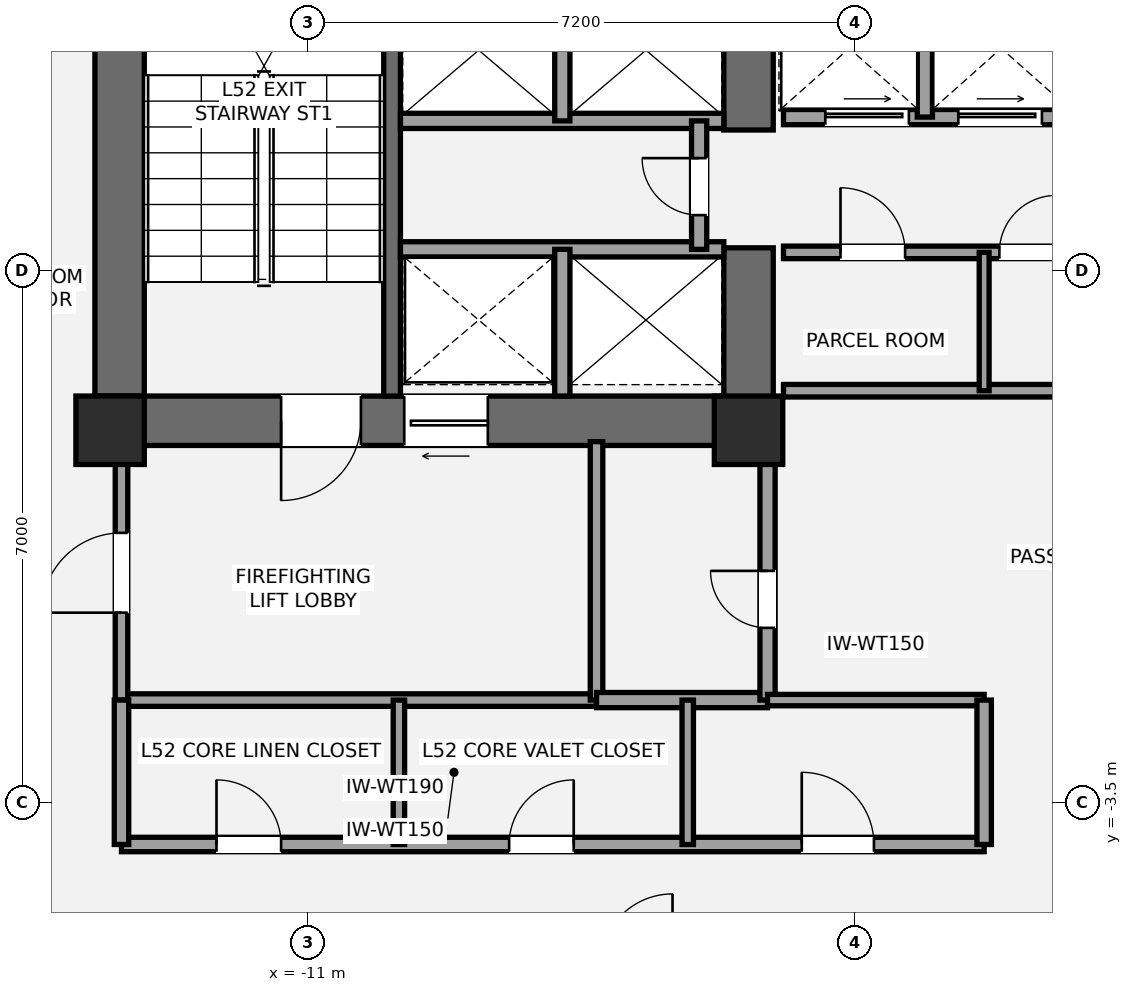
"""IFC4 building model, lengths in metres.
Left out: names, types, materials, properties, quantities, classifications, styles, units other than length and angle.
Written with IfcOpenShell. Run it as: python <this file> out.ifc"""

import sys

from ifc_helpers import new_model, si_unit, direction, frame, frame_2d, origin, origin_2d, place, context, subcontext, project, spatial, rectangle, extrude, element, fill, save


model = new_model("IFC4")
c1 = context("Model", 3, precision=1e-05, world=origin(), true_north=direction((0.0, 1.0)))
c2 = subcontext(c1, "Body", "Model", "MODEL_VIEW")
j1 = project(units=[si_unit("LENGTHUNIT", "METRE"), si_unit("PLANEANGLEUNIT", "RADIAN")], contexts=[c1])
p1 = place(None, origin())
s1 = spatial("IfcSite", under=j1, at=p1, CompositionType="ELEMENT")
p2 = place(p1, origin())
s2 = spatial("IfcBuilding", under=s1, at=p2, CompositionType="ELEMENT")
p3 = place(p2, frame((0.0, 0.0, 188.6)))
s3 = spatial("IfcBuildingStorey", under=s2, at=p3, CompositionType="ELEMENT", Elevation=188.6)
p4 = place(p3, frame((-13.475, 1.2, 0.0), z_axis=(0.0, 0.0, 1.0), x_axis=(0.0, 1.0, 0.0)))
e1 = element("IfcWall", 1, at=p4, inside=s3, PredefinedType="SHEAR", context=c2, shape_type="SweptSolid", body=[
    extrude(rectangle(XDim=8.45, YDim=0.65, at=frame_2d((4.225, 0.0))), origin(), (0.0, 0.0, 1.0), 3.2),
])
p5 = place(p3, frame((-4.875, 1.525, 0.0), z_axis=(0.0, 0.0, 1.0), x_axis=(-1.0, 0.0, 0.0)))
e2 = element("IfcWall", 2, at=p5, inside=s3, PredefinedType="SHEAR", context=c2, shape_type="SweptSolid", body=[
    extrude(rectangle(XDim=8.925, YDim=0.65, at=frame_2d((4.462, 0.0))), origin(), (0.0, 0.0, 1.0), 3.2),
])
p6 = place(p5, frame((5.425, 0.0, 0.0)))
e3 = element("IfcOpeningElement", 3, at=p6, cuts=e2, PredefinedType="OPENING", context=c2, shape_type="SweptSolid", body=[
    extrude(rectangle(XDim=1.05, YDim=2.15, at=frame_2d((0.525, 1.075))), frame((0.0, 0.335, 0.0), z_axis=(0.0, -1.0, 0.0), x_axis=(1.0, 0.0, 0.0)), (0.0, 0.0, 1.0), 0.67),
])
p7 = place(p5, frame((3.755, 0.0, 0.0)))
e4 = element("IfcOpeningElement", 4, at=p7, cuts=e2, PredefinedType="OPENING", context=c2, shape_type="SweptSolid", body=[
    extrude(rectangle(XDim=1.1, YDim=2.2, at=frame_2d((0.55, 1.1))), frame((0.0, 0.335, 0.0), z_axis=(0.0, -1.0, 0.0), x_axis=(1.0, 0.0, 0.0)), (0.0, 0.0, 1.0), 0.67),
])
p8 = place(p3, frame((-5.2, 1.2, 0.0), z_axis=(0.0, 0.0, 1.0), x_axis=(0.0, 1.0, 0.0)))
e5 = element("IfcWall", 5, at=p8, inside=s3, PredefinedType="SHEAR", context=c2, shape_type="SweptSolid", body=[
    extrude(rectangle(XDim=2.6, YDim=0.65, at=frame_2d((1.3, 0.0))), origin(), (0.0, 0.0, 1.0), 3.2),
])
p9 = place(p3, frame((-5.2, 5.35, 0.0), z_axis=(0.0, 0.0, 1.0), x_axis=(0.0, 1.0, 0.0)))
e6 = element("IfcWall", 6, at=p9, inside=s3, PredefinedType="SHEAR", context=c2, shape_type="SweptSolid", body=[
    extrude(rectangle(XDim=2.0, YDim=0.65, at=frame_2d((1.0, 0.0))), origin(), (0.0, 0.0, 1.0), 3.2),
])
p10 = place(p3, frame((-9.89, 1.85, 0.0), z_axis=(0.0, 0.0, 1.0), x_axis=(0.0, 1.0, 0.0)))
e7 = element("IfcWall", 7, at=p10, inside=s3, PredefinedType="SHEAR", context=c2, shape_type="SweptSolid", body=[
    extrude(rectangle(XDim=7.15, YDim=0.22, at=frame_2d((3.575, 0.0))), origin(), (0.0, 0.0, 1.0), 3.2),
])
for number, where, z_axis, x_axis in (
    (8, (-13.6, 1.4, 0.0), (0.0, 0.0, 1.0), (1.0, 0.0, 0.0)),
    (9, (-5.2, 1.4, 0.0), (0.0, 0.0, 1.0), (1.0, 0.0, 0.0)),
):
    element("IfcColumn", number, at=place(p3, frame(where, z_axis=z_axis, x_axis=x_axis)), inside=s3, PredefinedType="COLUMN", context=c2, shape_type="SweptSolid", body=[
        extrude(rectangle(XDim=0.9, YDim=0.9, at=origin_2d()), origin(), (0.0, 0.0, 1.0), 3.2),
    ])
p11 = place(p3, frame((-13.45, -2.15, 0.0), z_axis=(0.0, 0.0, 1.0), x_axis=(1.0, 0.0, 0.0)))
e10 = element("IfcWall", 10, at=p11, inside=s3, PredefinedType="PARTITIONING", context=c2, shape_type="SweptSolid", body=[
    extrude(rectangle(XDim=6.25, YDim=0.165, at=frame_2d((3.125, 0.0))), origin(), (0.0, 0.0, 1.0), 3.02),
])
p12 = place(p3, frame((-13.45, -2.15, 0.0), z_axis=(0.0, 0.0, 1.0), x_axis=(0.0, 1.0, 0.0)))
e11 = element("IfcWall", 11, at=p12, inside=s3, PredefinedType="PARTITIONING", context=c2, shape_type="SweptSolid", body=[
    extrude(rectangle(XDim=3.4, YDim=0.165, at=frame_2d((1.7, 0.0))), origin(), (0.0, 0.0, 1.0), 2.473),
])
p13 = place(p12, frame((1.15, 0.0, 0.0)))
e12 = element("IfcOpeningElement", 12, at=p13, cuts=e11, PredefinedType="OPENING", context=c2, shape_type="SweptSolid", body=[
    extrude(rectangle(XDim=1.05, YDim=2.15, at=frame_2d((0.525, 1.075))), frame((0.0, 0.093, 0.0), z_axis=(0.0, -1.0, 0.0), x_axis=(1.0, 0.0, 0.0)), (0.0, 0.0, 1.0), 0.185),
])
p14 = place(p3, frame((-7.2, -2.15, 0.0), z_axis=(0.0, 0.0, 1.0), x_axis=(0.0, 1.0, 0.0)))
e13 = element("IfcWall", 13, at=p14, inside=s3, PredefinedType="PARTITIONING", context=c2, shape_type="SweptSolid", body=[
    extrude(rectangle(XDim=3.4, YDim=0.165, at=frame_2d((1.7, 0.0))), origin(), (0.0, 0.0, 1.0), 2.473),
])
p15 = place(p3, frame((-7.2, -2.15, 0.0), z_axis=(0.0, 0.0, 1.0), x_axis=(1.0, 0.0, 0.0)))
e14 = element("IfcWall", 14, at=p15, inside=s3, PredefinedType="SOLIDWALL", context=c2, shape_type="SweptSolid", body=[
    extrude(rectangle(XDim=2.25, YDim=0.2, at=frame_2d((1.125, 0.0))), origin(), (0.0, 0.0, 1.0), 3.02),
])
p16 = place(p3, frame((-4.95, -2.15, 0.0), z_axis=(0.0, 0.0, 1.0), x_axis=(0.0, 1.0, 0.0)))
e15 = element("IfcWall", 15, at=p16, inside=s3, PredefinedType="SOLIDWALL", context=c2, shape_type="SweptSolid", body=[
    extrude(rectangle(XDim=3.4, YDim=0.2, at=frame_2d((1.7, 0.0))), origin(), (0.0, 0.0, 1.0), 2.473),
])
p17 = place(p16, frame((0.95, 0.0, 0.0)))
e16 = element("IfcOpeningElement", 16, at=p17, cuts=e15, PredefinedType="OPENING", context=c2, shape_type="SweptSolid", body=[
    extrude(rectangle(XDim=0.75, YDim=2.1, at=frame_2d((0.375, 1.05))), frame((0.0, 0.11, 0.0), z_axis=(0.0, -1.0, 0.0), x_axis=(1.0, 0.0, 0.0)), (0.0, 0.0, 1.0), 0.22),
])
p18 = place(p3, frame((-9.78, 3.78, 0.0), z_axis=(0.0, 0.0, 1.0), x_axis=(1.0, 0.0, 0.0)))
e17 = element("IfcWall", 17, at=p18, inside=s3, PredefinedType="SOLIDWALL", context=c2, shape_type="SweptSolid", body=[
    extrude(rectangle(XDim=4.255, YDim=0.2, at=frame_2d((2.127, 0.0))), origin(), (0.0, 0.0, 1.0), 3.02),
])
p19 = place(p3, frame((-7.65, 1.85, 0.0), z_axis=(0.0, 0.0, 1.0), x_axis=(0.0, 1.0, 0.0)))
e18 = element("IfcWall", 18, at=p19, inside=s3, PredefinedType="SOLIDWALL", context=c2, shape_type="SweptSolid", body=[
    extrude(rectangle(XDim=1.93, YDim=0.2, at=frame_2d((0.965, 0.0))), origin(), (0.0, 0.0, 1.0), 3.02),
])
p20 = place(p3, frame((-9.78, 5.47, 0.0), z_axis=(0.0, 0.0, 1.0), x_axis=(1.0, 0.0, 0.0)))
e19 = element("IfcWall", 19, at=p20, inside=s3, PredefinedType="SOLIDWALL", context=c2, shape_type="SweptSolid", body=[
    extrude(rectangle(XDim=4.255, YDim=0.2, at=frame_2d((2.127, 0.0))), origin(), (0.0, 0.0, 1.0), 3.02),
])
p21 = place(p3, frame((-7.65, 5.47, 0.0), z_axis=(0.0, 0.0, 1.0), x_axis=(0.0, 1.0, 0.0)))
e20 = element("IfcWall", 20, at=p21, inside=s3, PredefinedType="SOLIDWALL", context=c2, shape_type="SweptSolid", body=[
    extrude(rectangle(XDim=1.86, YDim=0.2, at=frame_2d((0.93, 0.0))), origin(), (0.0, 0.0, 1.0), 3.02),
])
p22 = place(p3, frame((-5.85, 3.78, 0.0), z_axis=(0.0, 0.0, 1.0), x_axis=(0.0, 1.0, 0.0)))
e21 = element("IfcWall", 21, at=p22, inside=s3, PredefinedType="SOLIDWALL", context=c2, shape_type="SweptSolid", body=[
    extrude(rectangle(XDim=1.69, YDim=0.2, at=frame_2d((0.845, 0.0))), origin(), (0.0, 0.0, 1.0), 3.02),
])
p23 = place(p22, frame((0.45, 0.0, 0.0)))
e22 = element("IfcOpeningElement", 22, at=p23, cuts=e21, PredefinedType="OPENING", context=c2, shape_type="SweptSolid", body=[
    extrude(rectangle(XDim=0.75, YDim=2.1, at=frame_2d((0.375, 1.05))), frame((0.0, 0.11, 0.0), z_axis=(0.0, -1.0, 0.0), x_axis=(1.0, 0.0, 0.0)), (0.0, 0.0, 1.0), 0.22),
])
p24 = place(p3, frame((-4.74, 1.92, 0.0), z_axis=(0.0, 0.0, 1.0), x_axis=(1.0, 0.0, 0.0)))
e23 = element("IfcWall", 23, at=p24, inside=s3, PredefinedType="PARTITIONING", context=c2, shape_type="SweptSolid", body=[
    extrude(rectangle(XDim=3.89, YDim=0.165, at=frame_2d((1.945, 0.0))), origin(), (0.0, 0.0, 1.0), 2.16),
])
p25 = place(p3, frame((-4.74, 3.74, 0.0), z_axis=(0.0, 0.0, 1.0), x_axis=(1.0, 0.0, 0.0)))
e24 = element("IfcWall", 24, at=p25, inside=s3, PredefinedType="PARTITIONING", context=c2, shape_type="SweptSolid", body=[
    extrude(rectangle(XDim=3.89, YDim=0.165, at=frame_2d((1.945, 0.0))), origin(), (0.0, 0.0, 1.0), 3.02),
])
p26 = place(p25, frame((0.75, 0.0, 0.0)))
e25 = element("IfcOpeningElement", 25, at=p26, cuts=e24, PredefinedType="OPENING", context=c2, shape_type="SweptSolid", body=[
    extrude(rectangle(XDim=0.85, YDim=2.1, at=frame_2d((0.425, 1.05))), frame((0.0, 0.093, 0.0), z_axis=(0.0, -1.0, 0.0), x_axis=(1.0, 0.0, 0.0)), (0.0, 0.0, 1.0), 0.185),
])
p27 = place(p25, frame((2.84, 0.0, 0.0)))
e26 = element("IfcOpeningElement", 26, at=p27, cuts=e24, PredefinedType="OPENING", context=c2, shape_type="SweptSolid", body=[
    extrude(rectangle(XDim=0.75, YDim=2.1, at=frame_2d((0.375, 1.05))), frame((0.0, 0.093, 0.0), z_axis=(0.0, -1.0, 0.0), x_axis=(1.0, 0.0, 0.0)), (0.0, 0.0, 1.0), 0.185),
])
p28 = place(p3, frame((-2.1, 1.92, 0.0), z_axis=(0.0, 0.0, 1.0), x_axis=(0.0, 1.0, 0.0)))
e27 = element("IfcWall", 27, at=p28, inside=s3, PredefinedType="PARTITIONING", context=c2, shape_type="SweptSolid", body=[
    extrude(rectangle(XDim=1.82, YDim=0.13, at=frame_2d((0.91, 0.0))), origin(), (0.0, 0.0, 1.0), 3.02),
])
p29 = place(p3, frame((-4.74, 5.52, 0.0), z_axis=(0.0, 0.0, 1.0), x_axis=(1.0, 0.0, 0.0)))
e28 = element("IfcWall", 28, at=p29, inside=s3, PredefinedType="SOLIDWALL", context=c2, shape_type="SweptSolid", body=[
    extrude(rectangle(XDim=3.86, YDim=0.2, at=frame_2d((1.93, 0.0))), origin(), (0.0, 0.0, 1.0), 3.02),
])
p30 = place(p29, frame((0.55, 0.0, 0.0)))
e29 = element("IfcOpeningElement", 29, at=p30, cuts=e28, PredefinedType="OPENING", context=c2, shape_type="SweptSolid", body=[
    extrude(rectangle(XDim=1.1, YDim=2.2, at=frame_2d((0.55, 1.1))), frame((0.0, 0.11, 0.0), z_axis=(0.0, -1.0, 0.0), x_axis=(1.0, 0.0, 0.0)), (0.0, 0.0, 1.0), 0.22),
])
p31 = place(p29, frame((2.3, 0.0, 0.0)))
e30 = element("IfcOpeningElement", 30, at=p31, cuts=e28, PredefinedType="OPENING", context=c2, shape_type="SweptSolid", body=[
    extrude(rectangle(XDim=1.1, YDim=2.2, at=frame_2d((0.55, 1.1))), frame((0.0, 0.11, 0.0), z_axis=(0.0, -1.0, 0.0), x_axis=(1.0, 0.0, 0.0)), (0.0, 0.0, 1.0), 0.22),
])
p32 = place(p3, frame((-2.88, 5.52, 0.0), z_axis=(0.0, 0.0, 1.0), x_axis=(0.0, 1.0, 0.0)))
e31 = element("IfcWall", 31, at=p32, inside=s3, PredefinedType="SOLIDWALL", context=c2, shape_type="SweptSolid", body=[
    extrude(rectangle(XDim=1.81, YDim=0.2, at=frame_2d((0.905, 0.0))), origin(), (0.0, 0.0, 1.0), 3.02),
])
p33 = place(p3, frame((-13.45, -4.05, 0.0), z_axis=(0.0, 0.0, 1.0), x_axis=(1.0, 0.0, 0.0)))
e32 = element("IfcWall", 32, at=p33, inside=s3, PredefinedType="PLUMBINGWALL", context=c2, shape_type="SweptSolid", body=[
    extrude(rectangle(XDim=11.35, YDim=0.19, at=frame_2d((5.675, 0.0))), origin(), (0.0, 0.0, 1.0), 2.473),
])
p34 = place(p33, frame((1.25, 0.0, 0.0)))
e33 = element("IfcOpeningElement", 33, at=p34, cuts=e32, PredefinedType="OPENING", context=c2, shape_type="SweptSolid", body=[
    extrude(rectangle(XDim=0.85, YDim=2.1, at=frame_2d((0.425, 1.05))), frame((0.0, 0.105, 0.0), z_axis=(0.0, -1.0, 0.0), x_axis=(1.0, 0.0, 0.0)), (0.0, 0.0, 1.0), 0.21),
])
p35 = place(p33, frame((5.1, 0.0, 0.0)))
e34 = element("IfcOpeningElement", 34, at=p35, cuts=e32, PredefinedType="OPENING", context=c2, shape_type="SweptSolid", body=[
    extrude(rectangle(XDim=0.85, YDim=2.1, at=frame_2d((0.425, 1.05))), frame((0.0, 0.105, 0.0), z_axis=(0.0, -1.0, 0.0), x_axis=(1.0, 0.0, 0.0)), (0.0, 0.0, 1.0), 0.21),
])
p36 = place(p33, frame((8.95, 0.0, 0.0)))
e35 = element("IfcOpeningElement", 35, at=p36, cuts=e32, PredefinedType="OPENING", context=c2, shape_type="SweptSolid", body=[
    extrude(rectangle(XDim=0.95, YDim=2.15, at=frame_2d((0.475, 1.075))), frame((0.0, 0.105, 0.0), z_axis=(0.0, -1.0, 0.0), x_axis=(1.0, 0.0, 0.0)), (0.0, 0.0, 1.0), 0.21),
])
p37 = place(p3, frame((-4.95, -2.15, 0.0), z_axis=(0.0, 0.0, 1.0), x_axis=(1.0, 0.0, 0.0)))
e36 = element("IfcWall", 36, at=p37, inside=s3, PredefinedType="PLUMBINGWALL", context=c2, shape_type="SweptSolid", body=[
    extrude(rectangle(XDim=2.85, YDim=0.15, at=frame_2d((1.425, 0.0))), origin(), (0.0, 0.0, 1.0), 2.473),
])
p38 = place(p3, frame((-13.45, -4.05, 0.0), z_axis=(0.0, 0.0, 1.0), x_axis=(0.0, 1.0, 0.0)))
e37 = element("IfcWall", 37, at=p38, inside=s3, PredefinedType="PLUMBINGWALL", context=c2, shape_type="SweptSolid", body=[
    extrude(rectangle(XDim=1.9, YDim=0.19, at=frame_2d((0.95, 0.0))), origin(), (0.0, 0.0, 1.0), 2.473),
])
p39 = place(p3, frame((-2.1, -4.05, 0.0), z_axis=(0.0, 0.0, 1.0), x_axis=(0.0, 1.0, 0.0)))
e38 = element("IfcWall", 38, at=p39, inside=s3, PredefinedType="PLUMBINGWALL", context=c2, shape_type="SweptSolid", body=[
    extrude(rectangle(XDim=1.9, YDim=0.19, at=frame_2d((0.95, 0.0))), origin(), (0.0, 0.0, 1.0), 3.02),
])
for number, where, z_axis, x_axis in (
    (39, (-9.8, -4.05, 0.0), (0.0, 0.0, 1.0), (0.0, 1.0, 0.0)),
    (40, (-6.0, -4.05, 0.0), (0.0, 0.0, 1.0), (0.0, 1.0, 0.0)),
):
    element("IfcWall", number, at=place(p3, frame(where, z_axis=z_axis, x_axis=x_axis)), inside=s3, PredefinedType="PLUMBINGWALL", context=c2, shape_type="SweptSolid", body=[
        extrude(rectangle(XDim=1.9, YDim=0.15, at=frame_2d((0.95, 0.0))), origin(), (0.0, 0.0, 1.0), 2.473),
    ])
p40 = place(p6, origin())
e41 = element("IfcDoor", 41, at=p40, inside=s3, OperationType="SINGLE_SWING_RIGHT", PredefinedType="DOOR", context=c2, shape_type="SweptSolid", body=[
    extrude(rectangle(XDim=1.05, YDim=2.15, at=frame_2d((0.525, 1.075))), frame((0.0, 0.025, 0.0), z_axis=(0.0, -1.0, 0.0), x_axis=(1.0, 0.0, 0.0)), (0.0, 0.0, 1.0), 0.05),
])
fill(e3, e41)
p41 = place(p13, origin())
e42 = element("IfcDoor", 42, at=p41, inside=s3, OperationType="SINGLE_SWING_LEFT", PredefinedType="DOOR", context=c2, shape_type="SweptSolid", body=[
    extrude(rectangle(XDim=1.05, YDim=2.15, at=frame_2d((0.525, 1.075))), frame((0.0, 0.025, 0.0), z_axis=(0.0, -1.0, 0.0), x_axis=(1.0, 0.0, 0.0)), (0.0, 0.0, 1.0), 0.05),
])
fill(e12, e42)
p42 = place(p17, origin())
e43 = element("IfcDoor", 43, at=p42, inside=s3, OperationType="SINGLE_SWING_RIGHT", PredefinedType="DOOR", context=c2, shape_type="SweptSolid", body=[
    extrude(rectangle(XDim=0.75, YDim=2.1, at=frame_2d((0.375, 1.05))), frame((0.0, 0.025, 0.0), z_axis=(0.0, -1.0, 0.0), x_axis=(1.0, 0.0, 0.0)), (0.0, 0.0, 1.0), 0.05),
])
fill(e16, e43)
p43 = place(p7, origin())
e44 = element("IfcDoor", 44, at=p43, inside=s3, OperationType="SLIDING_TO_LEFT", PredefinedType="DOOR", context=c2, shape_type="SweptSolid", body=[
    extrude(rectangle(XDim=1.1, YDim=2.2, at=frame_2d((0.55, 1.1))), frame((0.0, 0.025, 0.0), z_axis=(0.0, -1.0, 0.0), x_axis=(1.0, 0.0, 0.0)), (0.0, 0.0, 1.0), 0.05),
])
fill(e4, e44)
p44 = place(p23, origin())
e45 = element("IfcDoor", 45, at=p44, inside=s3, OperationType="SINGLE_SWING_RIGHT", PredefinedType="DOOR", context=c2, shape_type="SweptSolid", body=[
    extrude(rectangle(XDim=0.75, YDim=2.1, at=frame_2d((0.375, 1.05))), frame((0.0, 0.025, 0.0), z_axis=(0.0, -1.0, 0.0), x_axis=(1.0, 0.0, 0.0)), (0.0, 0.0, 1.0), 0.05),
])
fill(e22, e45)
p45 = place(p26, origin())
e46 = element("IfcDoor", 46, at=p45, inside=s3, OperationType="SINGLE_SWING_LEFT", PredefinedType="DOOR", context=c2, shape_type="SweptSolid", body=[
    extrude(rectangle(XDim=0.85, YDim=2.1, at=frame_2d((0.425, 1.05))), frame((0.0, 0.025, 0.0), z_axis=(0.0, -1.0, 0.0), x_axis=(1.0, 0.0, 0.0)), (0.0, 0.0, 1.0), 0.05),
])
fill(e25, e46)
p46 = place(p27, origin())
e47 = element("IfcDoor", 47, at=p46, inside=s3, OperationType="SINGLE_SWING_RIGHT", PredefinedType="DOOR", context=c2, shape_type="SweptSolid", body=[
    extrude(rectangle(XDim=0.75, YDim=2.1, at=frame_2d((0.375, 1.05))), frame((0.0, 0.025, 0.0), z_axis=(0.0, -1.0, 0.0), x_axis=(1.0, 0.0, 0.0)), (0.0, 0.0, 1.0), 0.05),
])
fill(e26, e47)
p47 = place(p30, origin())
e48 = element("IfcDoor", 48, at=p47, inside=s3, OperationType="SLIDING_TO_LEFT", PredefinedType="DOOR", context=c2, shape_type="SweptSolid", body=[
    extrude(rectangle(XDim=1.1, YDim=2.2, at=frame_2d((0.55, 1.1))), frame((0.0, 0.025, 0.0), z_axis=(0.0, -1.0, 0.0), x_axis=(1.0, 0.0, 0.0)), (0.0, 0.0, 1.0), 0.05),
])
fill(e29, e48)
p48 = place(p31, origin())
e49 = element("IfcDoor", 49, at=p48, inside=s3, OperationType="SLIDING_TO_LEFT", PredefinedType="DOOR", context=c2, shape_type="SweptSolid", body=[
    extrude(rectangle(XDim=1.1, YDim=2.2, at=frame_2d((0.55, 1.1))), frame((0.0, 0.025, 0.0), z_axis=(0.0, -1.0, 0.0), x_axis=(1.0, 0.0, 0.0)), (0.0, 0.0, 1.0), 0.05),
])
fill(e30, e49)
p49 = place(p34, origin())
e50 = element("IfcDoor", 50, at=p49, inside=s3, OperationType="SINGLE_SWING_LEFT", PredefinedType="DOOR", context=c2, shape_type="SweptSolid", body=[
    extrude(rectangle(XDim=0.85, YDim=2.1, at=frame_2d((0.425, 1.05))), frame((0.0, 0.025, 0.0), z_axis=(0.0, -1.0, 0.0), x_axis=(1.0, 0.0, 0.0)), (0.0, 0.0, 1.0), 0.05),
])
fill(e33, e50)
p50 = place(p35, origin())
e51 = element("IfcDoor", 51, at=p50, inside=s3, OperationType="SINGLE_SWING_RIGHT", PredefinedType="DOOR", context=c2, shape_type="SweptSolid", body=[
    extrude(rectangle(XDim=0.85, YDim=2.1, at=frame_2d((0.425, 1.05))), frame((0.0, 0.025, 0.0), z_axis=(0.0, -1.0, 0.0), x_axis=(1.0, 0.0, 0.0)), (0.0, 0.0, 1.0), 0.05),
])
fill(e34, e51)
p51 = place(p36, origin())
e52 = element("IfcDoor", 52, at=p51, inside=s3, OperationType="SINGLE_SWING_LEFT", PredefinedType="DOOR", context=c2, shape_type="SweptSolid", body=[
    extrude(rectangle(XDim=0.95, YDim=2.15, at=frame_2d((0.475, 1.075))), frame((0.0, 0.025, 0.0), z_axis=(0.0, -1.0, 0.0), x_axis=(1.0, 0.0, 0.0)), (0.0, 0.0, 1.0), 0.05),
])
fill(e35, e52)
save(model, sys.argv[1])
